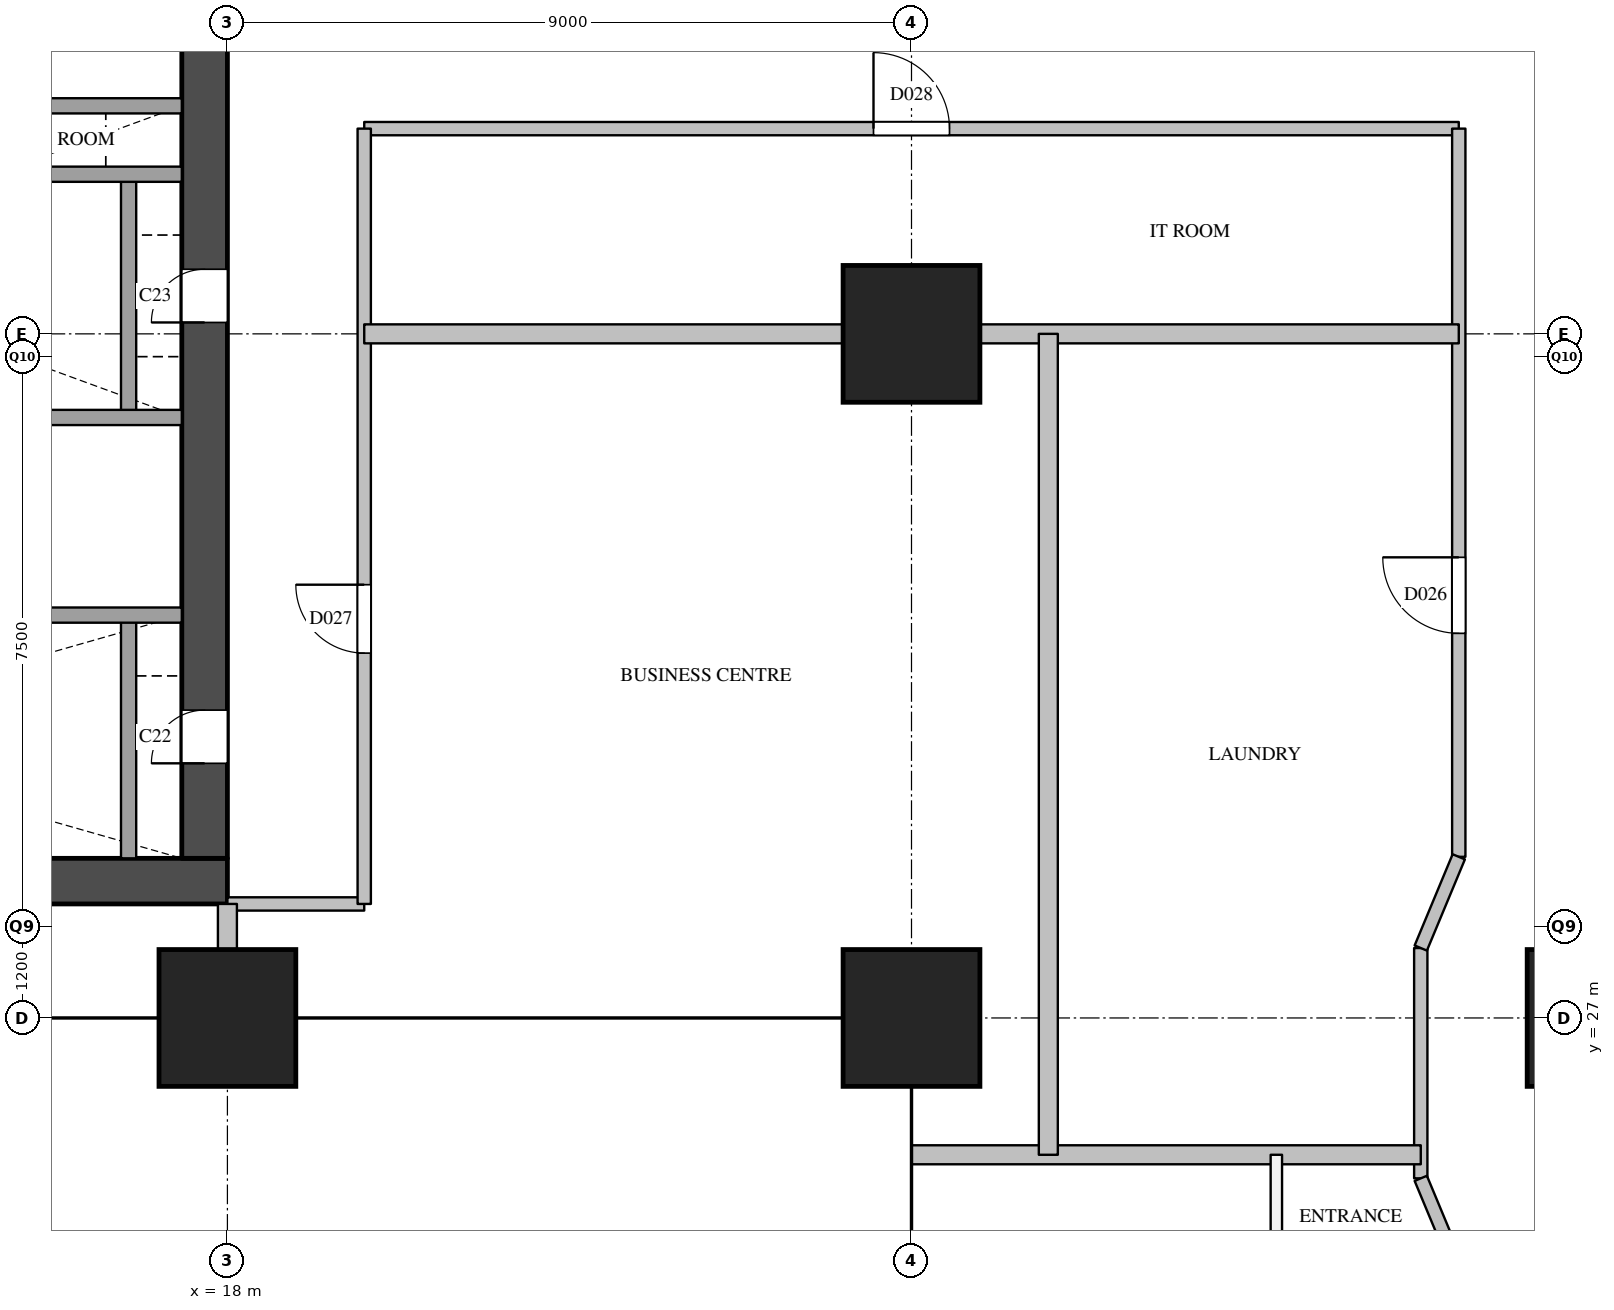
"""IFC4 building model, lengths in metres.
Left out: names, types, materials, properties, quantities, classifications, styles, units other than length and angle.
Written with IfcOpenShell. Run it as: python <this file> out.ifc"""

import sys

from ifc_helpers import new_model, si_unit, direction, frame, frame_2d, origin, origin_2d, place, context, subcontext, project, spatial, rectangle, extrude, element, fill, save


model = new_model("IFC4")
c1 = context("Model", 3, precision=1e-05, world=origin(), true_north=direction((0.0, 1.0)))
c2 = subcontext(c1, "Body", "Model", "MODEL_VIEW")
j1 = project(units=[si_unit("LENGTHUNIT", "METRE"), si_unit("PLANEANGLEUNIT", "RADIAN")], contexts=[c1])
p1 = place(None, origin())
s1 = spatial("IfcSite", under=j1, at=p1, CompositionType="ELEMENT")
p2 = place(p1, origin())
s2 = spatial("IfcBuilding", under=s1, at=p2, CompositionType="ELEMENT")
p3 = place(p2, frame((0.0, 0.0, 112.0)))
s3 = spatial("IfcBuildingStorey", under=s2, at=p3, CompositionType="ELEMENT", Elevation=112.0)
for number, where, z_axis, x_axis in (
    (1, (18.0, 27.0, 0.0), (0.0, 0.0, 1.0), (1.0, 0.0, 0.0)),
    (2, (27.0, 27.0, 0.0), (0.0, 0.0, 1.0), (1.0, 0.0, 0.0)),
    (3, (27.0, 36.0, 0.0), (0.0, 0.0, 1.0), (1.0, 0.0, 0.0)),
    (4, (36.0, 27.0, 0.0), (0.0, 0.0, 1.0), (1.0, 0.0, 0.0)),
):
    element("IfcColumn", number, at=place(p3, frame(where, z_axis=z_axis, x_axis=x_axis)), inside=s3, PredefinedType="COLUMN", context=c2, shape_type="SweptSolid", body=[
        extrude(rectangle(XDim=1.8, YDim=1.8, at=origin_2d()), origin(), (0.0, 0.0, 1.0), 3.8),
    ])
p4 = place(p3, frame((5.6, 28.8, 0.0), z_axis=(0.0, 0.0, 1.0), x_axis=(1.0, 0.0, 0.0)))
e5 = element("IfcWall", 5, at=p4, inside=s3, PredefinedType="SHEAR", context=c2, shape_type="SweptSolid", body=[
    extrude(rectangle(XDim=12.4, YDim=0.6, at=frame_2d((6.2, 0.0))), origin(), (0.0, 0.0, 1.0), 3.5),
])
p5 = place(p4, frame((1.05, 0.0, 0.0)))
e6 = element("IfcOpeningElement", 6, at=p5, cuts=e5, PredefinedType="OPENING", context=c2, shape_type="SweptSolid", body=[
    extrude(rectangle(XDim=1.2, YDim=2.1, at=frame_2d((0.6, 1.05))), frame((0.0, 0.31, 0.0), z_axis=(0.0, -1.0, 0.0), x_axis=(1.0, 0.0, 0.0)), (0.0, 0.0, 1.0), 0.62),
])
p6 = place(p4, frame((5.25, 0.0, 0.0)))
e7 = element("IfcOpeningElement", 7, at=p6, cuts=e5, PredefinedType="OPENING", context=c2, shape_type="SweptSolid", body=[
    extrude(rectangle(XDim=1.2, YDim=2.1, at=frame_2d((0.6, 1.05))), frame((0.0, 0.31, 0.0), z_axis=(0.0, -1.0, 0.0), x_axis=(1.0, 0.0, 0.0)), (0.0, 0.0, 1.0), 0.62),
])
p7 = place(p4, frame((7.35, 0.0, 0.0)))
e8 = element("IfcOpeningElement", 8, at=p7, cuts=e5, PredefinedType="OPENING", context=c2, shape_type="SweptSolid", body=[
    extrude(rectangle(XDim=1.2, YDim=2.1, at=frame_2d((0.6, 1.05))), frame((0.0, 0.31, 0.0), z_axis=(0.0, -1.0, 0.0), x_axis=(1.0, 0.0, 0.0)), (0.0, 0.0, 1.0), 0.62),
])
p8 = place(p3, frame((17.7, 29.1, 0.0), z_axis=(0.0, 0.0, 1.0), x_axis=(0.0, 1.0, 0.0)))
e9 = element("IfcWall", 9, at=p8, inside=s3, PredefinedType="SHEAR", context=c2, shape_type="SweptSolid", body=[
    extrude(rectangle(XDim=20.3, YDim=0.6, at=frame_2d((10.15, 0.0))), origin(), (0.0, 0.0, 1.0), 3.5),
])
p9 = place(p8, frame((1.25, 0.0, 0.0)))
e10 = element("IfcOpeningElement", 10, at=p9, cuts=e9, PredefinedType="OPENING", context=c2, shape_type="SweptSolid", body=[
    extrude(rectangle(XDim=0.7, YDim=2.1, at=frame_2d((0.35, 1.05))), frame((0.0, 0.31, 0.0), z_axis=(0.0, -1.0, 0.0), x_axis=(1.0, 0.0, 0.0)), (0.0, 0.0, 1.0), 0.62),
])
p10 = place(p8, frame((7.05, 0.0, 0.0)))
e11 = element("IfcOpeningElement", 11, at=p10, cuts=e9, PredefinedType="OPENING", context=c2, shape_type="SweptSolid", body=[
    extrude(rectangle(XDim=0.7, YDim=2.1, at=frame_2d((0.35, 1.05))), frame((0.0, 0.31, 0.0), z_axis=(0.0, -1.0, 0.0), x_axis=(1.0, 0.0, 0.0)), (0.0, 0.0, 1.0), 0.62),
])
p11 = place(p3, frame((16.7, 29.1, 0.0), z_axis=(0.0, 0.0, 1.0), x_axis=(0.0, 1.0, 0.0)))
e12 = element("IfcWall", 12, at=p11, inside=s3, PredefinedType="SOLIDWALL", context=c2, shape_type="SweptSolid", body=[
    extrude(rectangle(XDim=3.2, YDim=0.2, at=frame_2d((1.6, 0.0))), origin(), (0.0, 0.0, 1.0), 3.5),
])
p12 = place(p3, frame((16.7, 34.9, 0.0), z_axis=(0.0, 0.0, 1.0), x_axis=(0.0, 1.0, 0.0)))
e13 = element("IfcWall", 13, at=p12, inside=s3, PredefinedType="SOLIDWALL", context=c2, shape_type="SweptSolid", body=[
    extrude(rectangle(XDim=3.2, YDim=0.2, at=frame_2d((1.6, 0.0))), origin(), (0.0, 0.0, 1.0), 3.5),
])
p13 = place(p3, frame((6.2, 32.3, 0.0), z_axis=(0.0, 0.0, 1.0), x_axis=(1.0, 0.0, 0.0)))
e14 = element("IfcWall", 14, at=p13, inside=s3, PredefinedType="SOLIDWALL", context=c2, shape_type="SweptSolid", body=[
    extrude(rectangle(XDim=11.2, YDim=0.2, at=frame_2d((5.6, 0.0))), origin(), (0.0, 0.0, 1.0), 3.5),
])
p14 = place(p13, frame((2.55, 0.0, 0.0)))
e15 = element("IfcOpeningElement", 15, at=p14, cuts=e14, PredefinedType="OPENING", context=c2, shape_type="SweptSolid", body=[
    extrude(rectangle(XDim=1.2, YDim=2.1, at=frame_2d((0.6, 1.05))), frame((0.0, 0.11, 0.0), z_axis=(0.0, -1.0, 0.0), x_axis=(1.0, 0.0, 0.0)), (0.0, 0.0, 1.0), 0.22),
])
p15 = place(p3, frame((6.2, 34.9, 0.0), z_axis=(0.0, 0.0, 1.0), x_axis=(1.0, 0.0, 0.0)))
e16 = element("IfcWall", 16, at=p15, inside=s3, PredefinedType="SOLIDWALL", context=c2, shape_type="SweptSolid", body=[
    extrude(rectangle(XDim=11.2, YDim=0.2, at=frame_2d((5.6, 0.0))), origin(), (0.0, 0.0, 1.0), 3.5),
])
p16 = place(p3, frame((6.2, 38.1, 0.0), z_axis=(0.0, 0.0, 1.0), x_axis=(1.0, 0.0, 0.0)))
e17 = element("IfcWall", 17, at=p16, inside=s3, PredefinedType="SOLIDWALL", context=c2, shape_type="SweptSolid", body=[
    extrude(rectangle(XDim=11.2, YDim=0.2, at=frame_2d((5.6, 0.0))), origin(), (0.0, 0.0, 1.0), 3.5),
])
p17 = place(p16, frame((0.45, 0.0, 0.0)))
e18 = element("IfcOpeningElement", 18, at=p17, cuts=e17, PredefinedType="OPENING", context=c2, shape_type="SweptSolid", body=[
    extrude(rectangle(XDim=1.2, YDim=2.1, at=frame_2d((0.6, 1.05))), frame((0.0, 0.11, 0.0), z_axis=(0.0, -1.0, 0.0), x_axis=(1.0, 0.0, 0.0)), (0.0, 0.0, 1.0), 0.22),
])
p18 = place(p16, frame((2.55, 0.0, 0.0)))
e19 = element("IfcOpeningElement", 19, at=p18, cuts=e17, PredefinedType="OPENING", context=c2, shape_type="SweptSolid", body=[
    extrude(rectangle(XDim=1.2, YDim=2.1, at=frame_2d((0.6, 1.05))), frame((0.0, 0.11, 0.0), z_axis=(0.0, -1.0, 0.0), x_axis=(1.0, 0.0, 0.0)), (0.0, 0.0, 1.0), 0.22),
])
p19 = place(p16, frame((4.65, 0.0, 0.0)))
e20 = element("IfcOpeningElement", 20, at=p19, cuts=e17, PredefinedType="OPENING", context=c2, shape_type="SweptSolid", body=[
    extrude(rectangle(XDim=1.2, YDim=2.1, at=frame_2d((0.6, 1.05))), frame((0.0, 0.11, 0.0), z_axis=(0.0, -1.0, 0.0), x_axis=(1.0, 0.0, 0.0)), (0.0, 0.0, 1.0), 0.22),
])
p20 = place(p16, frame((6.75, 0.0, 0.0)))
e21 = element("IfcOpeningElement", 21, at=p20, cuts=e17, PredefinedType="OPENING", context=c2, shape_type="SweptSolid", body=[
    extrude(rectangle(XDim=1.2, YDim=2.1, at=frame_2d((0.6, 1.05))), frame((0.0, 0.11, 0.0), z_axis=(0.0, -1.0, 0.0), x_axis=(1.0, 0.0, 0.0)), (0.0, 0.0, 1.0), 0.22),
])
p21 = place(p3, frame((12.5, 39.0, 0.0), z_axis=(0.0, 0.0, 1.0), x_axis=(1.0, 0.0, 0.0)))
e22 = element("IfcWall", 22, at=p21, inside=s3, PredefinedType="SOLIDWALL", context=c2, shape_type="SweptSolid", body=[
    extrude(rectangle(XDim=4.9, YDim=0.2, at=frame_2d((2.45, 0.0))), origin(), (0.0, 0.0, 1.0), 3.5),
])
p22 = place(p3, frame((18.0, 28.5, 0.0), z_axis=(0.0, 0.0, 1.0), x_axis=(1.0, 0.0, 0.0)))
e23 = element("IfcWall", 23, at=p22, inside=s3, PredefinedType="PARTITIONING", context=c2, shape_type="SweptSolid", body=[
    extrude(rectangle(XDim=1.8, YDim=0.175, at=frame_2d((0.9, 0.0))), origin(), (0.0, 0.0, 1.0), 3.5),
])
p23 = place(p3, frame((19.8, 38.7, 0.0), z_axis=(0.0, 0.0, 1.0), x_axis=(1.0, 0.0, 0.0)))
e24 = element("IfcWall", 24, at=p23, inside=s3, PredefinedType="PARTITIONING", context=c2, shape_type="SweptSolid", body=[
    extrude(rectangle(XDim=14.4, YDim=0.175, at=frame_2d((7.2, 0.0))), origin(), (0.0, 0.0, 1.0), 2.5),
])
p24 = place(p23, frame((6.7, 0.0, 0.0)))
e25 = element("IfcOpeningElement", 25, at=p24, cuts=e24, PredefinedType="OPENING", context=c2, shape_type="SweptSolid", body=[
    extrude(rectangle(XDim=1.0, YDim=2.1, at=frame_2d((0.5, 1.05))), frame((0.0, 0.097, 0.0), z_axis=(0.0, -1.0, 0.0), x_axis=(1.0, 0.0, 0.0)), (0.0, 0.0, 1.0), 0.195),
])
p25 = place(p3, frame((19.8, 28.5, 0.0), z_axis=(0.0, 0.0, 1.0), x_axis=(0.0, 1.0, 0.0)))
e26 = element("IfcWall", 26, at=p25, inside=s3, PredefinedType="PARTITIONING", context=c2, shape_type="SweptSolid", body=[
    extrude(rectangle(XDim=10.2, YDim=0.175, at=frame_2d((5.1, 0.0))), origin(), (0.0, 0.0, 1.0), 3.5),
])
p26 = place(p25, frame((3.3, 0.0, 0.0)))
e27 = element("IfcOpeningElement", 27, at=p26, cuts=e26, PredefinedType="OPENING", context=c2, shape_type="SweptSolid", body=[
    extrude(rectangle(XDim=0.9, YDim=2.1, at=frame_2d((0.45, 1.05))), frame((0.0, 0.097, 0.0), z_axis=(0.0, -1.0, 0.0), x_axis=(1.0, 0.0, 0.0)), (0.0, 0.0, 1.0), 0.195),
])
p27 = place(p3, frame((33.7, 24.89, 0.0), z_axis=(0.0, 0.0, 1.0), x_axis=(0.0, 1.0, 0.0)))
e28 = element("IfcWall", 28, at=p27, inside=s3, PredefinedType="PARTITIONING", context=c2, shape_type="SweptSolid", body=[
    extrude(rectangle(XDim=3.03, YDim=0.175, at=frame_2d((1.515, 0.0))), origin(), (0.0, 0.0, 1.0), 2.5),
])
p28 = place(p3, frame((34.2, 29.12, 0.0), z_axis=(0.0, 0.0, 1.0), x_axis=(0.0, 1.0, 0.0)))
e29 = element("IfcWall", 29, at=p28, inside=s3, PredefinedType="PARTITIONING", context=c2, shape_type="SweptSolid", body=[
    extrude(rectangle(XDim=9.58, YDim=0.175, at=frame_2d((4.79, 0.0))), origin(), (0.0, 0.0, 1.0), 3.5),
])
p29 = place(p28, frame((2.94, 0.0, 0.0)))
e30 = element("IfcOpeningElement", 30, at=p29, cuts=e29, PredefinedType="OPENING", context=c2, shape_type="SweptSolid", body=[
    extrude(rectangle(XDim=1.0, YDim=2.1, at=frame_2d((0.5, 1.05))), frame((0.0, 0.097, 0.0), z_axis=(0.0, -1.0, 0.0), x_axis=(1.0, 0.0, 0.0)), (0.0, 0.0, 1.0), 0.195),
])
p30 = place(p3, frame((31.8, 20.4, 0.0), z_axis=(0.0, 0.0, 1.0), x_axis=(0.0, 1.0, 0.0)))
e31 = element("IfcWall", 31, at=p30, inside=s3, PredefinedType="PARTITIONING", context=c2, shape_type="SweptSolid", body=[
    extrude(rectangle(XDim=4.8, YDim=0.15, at=frame_2d((2.4, 0.0))), origin(), (0.0, 0.0, 1.0), 3.5),
])
p31 = place(p30, frame((1.95, 0.0, 0.0)))
e32 = element("IfcOpeningElement", 32, at=p31, cuts=e31, PredefinedType="OPENING", context=c2, shape_type="SweptSolid", body=[
    extrude(rectangle(XDim=0.9, YDim=2.1, at=frame_2d((0.45, 1.05))), frame((0.0, 0.085, 0.0), z_axis=(0.0, -1.0, 0.0), x_axis=(1.0, 0.0, 0.0)), (0.0, 0.0, 1.0), 0.17),
])
p32 = place(p3, frame((27.0, 25.2, 0.0), z_axis=(0.0, 0.0, 1.0), x_axis=(1.0, 0.0, 0.0)))
e33 = element("IfcWall", 33, at=p32, inside=s3, PredefinedType="PARTITIONING", context=c2, shape_type="SweptSolid", body=[
    extrude(rectangle(XDim=6.7, YDim=0.25, at=frame_2d((3.35, 0.0))), origin(), (0.0, 0.0, 1.0), 2.5),
])
p33 = place(p3, frame((19.8, 36.0, 0.0), z_axis=(0.0, 0.0, 1.0), x_axis=(1.0, 0.0, 0.0)))
e34 = element("IfcWall", 34, at=p33, inside=s3, PredefinedType="PARTITIONING", context=c2, shape_type="SweptSolid", body=[
    extrude(rectangle(XDim=14.4, YDim=0.25, at=frame_2d((7.2, 0.0))), origin(), (0.0, 0.0, 1.0), 3.5),
])
p34 = place(p3, frame((18.0, 27.0, 0.0), z_axis=(0.0, 0.0, 1.0), x_axis=(0.0, 1.0, 0.0)))
e35 = element("IfcWall", 35, at=p34, inside=s3, PredefinedType="PARTITIONING", context=c2, shape_type="SweptSolid", body=[
    extrude(rectangle(XDim=1.5, YDim=0.25, at=frame_2d((0.75, 0.0))), origin(), (0.0, 0.0, 1.0), 3.5),
])
p35 = place(p3, frame((28.8, 25.2, 0.0), z_axis=(0.0, 0.0, 1.0), x_axis=(0.0, 1.0, 0.0)))
e36 = element("IfcWall", 36, at=p35, inside=s3, PredefinedType="PARTITIONING", context=c2, shape_type="SweptSolid", body=[
    extrude(rectangle(XDim=10.8, YDim=0.25, at=frame_2d((5.4, 0.0))), origin(), (0.0, 0.0, 1.0), 2.5),
])
p36 = place(p3, frame((34.2, 23.69, 0.0), z_axis=(0.0, 0.0, 1.0), x_axis=(-0.384628719983, 0.923071366561, 0.0)))
e37 = element("IfcWall", 37, at=p36, inside=s3, PredefinedType="PARTITIONING", context=c2, shape_type="SweptSolid", body=[
    extrude(rectangle(XDim=1.3, YDim=0.175, at=frame_2d((0.65, 0.0))), origin(), (0.0, 0.0, 1.0), 3.5),
])
p37 = place(p3, frame((33.7, 27.92, 0.0), z_axis=(0.0, 0.0, 1.0), x_axis=(0.384562051588, 0.923099143363, 0.0)))
e38 = element("IfcWall", 38, at=p37, inside=s3, PredefinedType="PARTITIONING", context=c2, shape_type="SweptSolid", body=[
    extrude(rectangle(XDim=1.3, YDim=0.175, at=frame_2d((0.65, 0.0))), origin(), (0.0, 0.0, 1.0), 3.5),
])
p38 = place(p9, origin())
e39 = element("IfcDoor", 39, at=p38, inside=s3, OperationType="SINGLE_SWING_LEFT", PredefinedType="DOOR", context=c2, shape_type="SweptSolid", body=[
    extrude(rectangle(XDim=0.7, YDim=2.1, at=frame_2d((0.35, 1.05))), frame((0.0, 0.025, 0.0), z_axis=(0.0, -1.0, 0.0), x_axis=(1.0, 0.0, 0.0)), (0.0, 0.0, 1.0), 0.05),
])
fill(e10, e39)
p39 = place(p10, origin())
e40 = element("IfcDoor", 40, at=p39, inside=s3, OperationType="SINGLE_SWING_LEFT", PredefinedType="DOOR", context=c2, shape_type="SweptSolid", body=[
    extrude(rectangle(XDim=0.7, YDim=2.1, at=frame_2d((0.35, 1.05))), frame((0.0, 0.025, 0.0), z_axis=(0.0, -1.0, 0.0), x_axis=(1.0, 0.0, 0.0)), (0.0, 0.0, 1.0), 0.05),
])
fill(e11, e40)
p40 = place(p29, origin())
e41 = element("IfcDoor", 41, at=p40, inside=s3, OperationType="SINGLE_SWING_RIGHT", PredefinedType="DOOR", context=c2, shape_type="SweptSolid", body=[
    extrude(rectangle(XDim=1.0, YDim=2.1, at=frame_2d((0.5, 1.05))), frame((0.0, 0.025, 0.0), z_axis=(0.0, -1.0, 0.0), x_axis=(1.0, 0.0, 0.0)), (0.0, 0.0, 1.0), 0.05),
])
fill(e30, e41)
p41 = place(p26, origin())
e42 = element("IfcDoor", 42, at=p41, inside=s3, OperationType="SINGLE_SWING_RIGHT", PredefinedType="DOOR", context=c2, shape_type="SweptSolid", body=[
    extrude(rectangle(XDim=0.9, YDim=2.1, at=frame_2d((0.45, 1.05))), frame((0.0, 0.025, 0.0), z_axis=(0.0, -1.0, 0.0), x_axis=(1.0, 0.0, 0.0)), (0.0, 0.0, 1.0), 0.05),
])
fill(e27, e42)
p42 = place(p24, origin())
e43 = element("IfcDoor", 43, at=p42, inside=s3, OperationType="SINGLE_SWING_LEFT", PredefinedType="DOOR", context=c2, shape_type="SweptSolid", body=[
    extrude(rectangle(XDim=1.0, YDim=2.1, at=frame_2d((0.5, 1.05))), frame((0.0, 0.025, 0.0), z_axis=(0.0, -1.0, 0.0), x_axis=(1.0, 0.0, 0.0)), (0.0, 0.0, 1.0), 0.05),
])
fill(e25, e43)
save(model, sys.argv[1])
